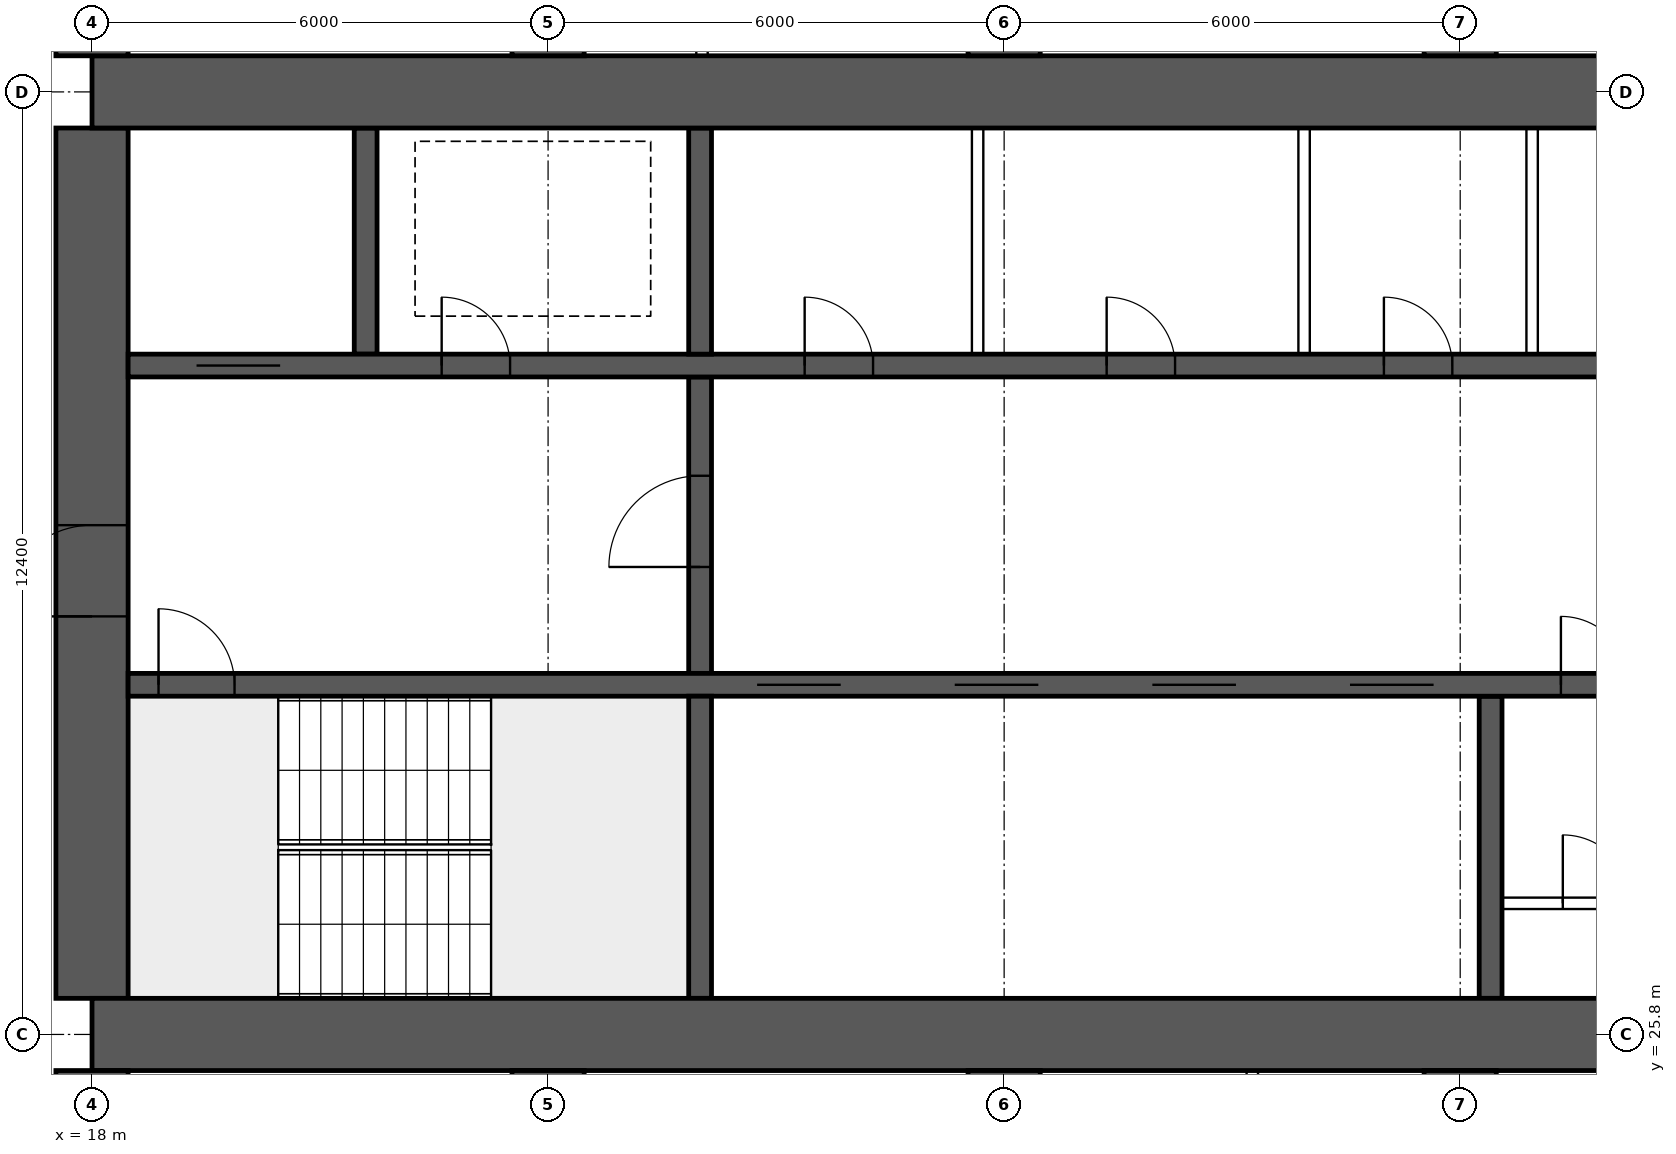
"""IFC4 building model, lengths in metres.
Left out: names, types, materials, properties, quantities, classifications, styles, units other than length and angle.
Written with IfcOpenShell. Run it as: python <this file> out.ifc"""

import sys

from ifc_helpers import new_model, si_unit, direction, frame, frame_2d, origin, place, context, subcontext, project, spatial, rectangle, extrude, element, fill, save


model = new_model("IFC4")
c1 = context("Model", 3, precision=1e-05, world=origin(), true_north=direction((0.0, 1.0)))
c2 = subcontext(c1, "Body", "Model", "MODEL_VIEW")
j1 = project(units=[si_unit("LENGTHUNIT", "METRE"), si_unit("PLANEANGLEUNIT", "RADIAN")], contexts=[c1])
p1 = place(None, origin())
s1 = spatial("IfcSite", under=j1, at=p1, CompositionType="ELEMENT")
p2 = place(p1, origin())
s2 = spatial("IfcBuilding", under=s1, at=p2, CompositionType="ELEMENT")
p3 = place(p2, frame((0.0, 0.0, 106.9)))
s3 = spatial("IfcBuildingStorey", under=s2, at=p3, CompositionType="ELEMENT", Elevation=106.9)
for number, where, z_axis, x_axis in (
    (1, (18.0, 25.8, 0.0), (0.0, 0.0, 1.0), (1.0, 0.0, 0.0)),
    (2, (18.0, 38.2, 0.0), (0.0, 0.0, 1.0), (1.0, 0.0, 0.0)),
):
    element("IfcWall", number, at=place(p3, frame(where, z_axis=z_axis, x_axis=x_axis)), inside=s3, PredefinedType="SHEAR", context=c2, shape_type="SweptSolid", body=[
        extrude(rectangle(XDim=48.0, YDim=0.95, at=frame_2d((24.0, 0.0))), origin(), (0.0, 0.0, 1.0), 3.75),
    ])
p4 = place(p3, frame((18.0, 26.275, 0.0), z_axis=(0.0, 0.0, 1.0), x_axis=(0.0, 1.0, 0.0)))
e3 = element("IfcWall", 3, at=p4, inside=s3, PredefinedType="SHEAR", context=c2, shape_type="SweptSolid", body=[
    extrude(rectangle(XDim=11.45, YDim=0.95, at=frame_2d((5.725, 0.0))), origin(), (0.0, 0.0, 1.0), 3.75),
])
p5 = place(p4, frame((5.025, 0.0, 0.0)))
e4 = element("IfcOpeningElement", 4, at=p5, cuts=e3, PredefinedType="OPENING", context=c2, shape_type="SweptSolid", body=[
    extrude(rectangle(XDim=1.2, YDim=2.1, at=frame_2d((0.6, 1.05))), frame((0.0, 0.485, 0.0), z_axis=(0.0, -1.0, 0.0), x_axis=(1.0, 0.0, 0.0)), (0.0, 0.0, 1.0), 0.97),
])
p6 = place(p3, frame((18.475, 30.4, 0.0), z_axis=(0.0, 0.0, 1.0), x_axis=(1.0, 0.0, 0.0)))
e5 = element("IfcWall", 5, at=p6, inside=s3, PredefinedType="SHEAR", context=c2, shape_type="SweptSolid", body=[
    extrude(rectangle(XDim=47.05, YDim=0.3, at=frame_2d((23.525, 0.0))), origin(), (0.0, 0.0, 1.0), 3.75),
])
p7 = place(p6, frame((0.4, 0.0, 0.0)))
e6 = element("IfcOpeningElement", 6, at=p7, cuts=e5, PredefinedType="OPENING", context=c2, shape_type="SweptSolid", body=[
    extrude(rectangle(XDim=1.0, YDim=2.1, at=frame_2d((0.5, 1.05))), frame((0.0, 0.16, 0.0), z_axis=(0.0, -1.0, 0.0), x_axis=(1.0, 0.0, 0.0)), (0.0, 0.0, 1.0), 0.32),
])
p8 = place(p6, frame((45.65, 0.0, 0.0)))
e7 = element("IfcOpeningElement", 7, at=p8, cuts=e5, PredefinedType="OPENING", context=c2, shape_type="SweptSolid", body=[
    extrude(rectangle(XDim=1.0, YDim=2.1, at=frame_2d((0.5, 1.05))), frame((0.0, 0.16, 0.0), z_axis=(0.0, -1.0, 0.0), x_axis=(1.0, 0.0, 0.0)), (0.0, 0.0, 1.0), 0.32),
])
p9 = place(p6, frame((8.275, 0.0, 0.0)))
e8 = element("IfcOpeningElement", 8, at=p9, cuts=e5, PredefinedType="OPENING", context=c2, shape_type="SweptSolid", body=[
    extrude(rectangle(XDim=1.1, YDim=2.1, at=frame_2d((0.55, 1.05))), frame((0.0, 0.16, 0.0), z_axis=(0.0, -1.0, 0.0), x_axis=(1.0, 0.0, 0.0)), (0.0, 0.0, 1.0), 0.32),
])
p10 = place(p6, frame((10.875, 0.0, 0.0)))
e9 = element("IfcOpeningElement", 9, at=p10, cuts=e5, PredefinedType="OPENING", context=c2, shape_type="SweptSolid", body=[
    extrude(rectangle(XDim=1.1, YDim=2.1, at=frame_2d((0.55, 1.05))), frame((0.0, 0.16, 0.0), z_axis=(0.0, -1.0, 0.0), x_axis=(1.0, 0.0, 0.0)), (0.0, 0.0, 1.0), 0.32),
])
p11 = place(p6, frame((13.475, 0.0, 0.0)))
e10 = element("IfcOpeningElement", 10, at=p11, cuts=e5, PredefinedType="OPENING", context=c2, shape_type="SweptSolid", body=[
    extrude(rectangle(XDim=1.1, YDim=2.1, at=frame_2d((0.55, 1.05))), frame((0.0, 0.16, 0.0), z_axis=(0.0, -1.0, 0.0), x_axis=(1.0, 0.0, 0.0)), (0.0, 0.0, 1.0), 0.32),
])
p12 = place(p6, frame((16.075, 0.0, 0.0)))
e11 = element("IfcOpeningElement", 11, at=p12, cuts=e5, PredefinedType="OPENING", context=c2, shape_type="SweptSolid", body=[
    extrude(rectangle(XDim=1.1, YDim=2.1, at=frame_2d((0.55, 1.05))), frame((0.0, 0.16, 0.0), z_axis=(0.0, -1.0, 0.0), x_axis=(1.0, 0.0, 0.0)), (0.0, 0.0, 1.0), 0.32),
])
p13 = place(p6, frame((18.85, 0.0, 0.0)))
e12 = element("IfcOpeningElement", 12, at=p13, cuts=e5, PredefinedType="OPENING", context=c2, shape_type="SweptSolid", body=[
    extrude(rectangle(XDim=0.9, YDim=2.1, at=frame_2d((0.45, 1.05))), frame((0.0, 0.16, 0.0), z_axis=(0.0, -1.0, 0.0), x_axis=(1.0, 0.0, 0.0)), (0.0, 0.0, 1.0), 0.32),
])
p14 = place(p6, frame((30.142, 0.0, 0.0)))
e13 = element("IfcOpeningElement", 13, at=p14, cuts=e5, PredefinedType="OPENING", context=c2, shape_type="SweptSolid", body=[
    extrude(rectangle(XDim=1.1, YDim=2.1, at=frame_2d((0.55, 1.05))), frame((0.0, 0.16, 0.0), z_axis=(0.0, -1.0, 0.0), x_axis=(1.0, 0.0, 0.0)), (0.0, 0.0, 1.0), 0.32),
])
p15 = place(p6, frame((33.675, 0.0, 0.0)))
e14 = element("IfcOpeningElement", 14, at=p15, cuts=e5, PredefinedType="OPENING", context=c2, shape_type="SweptSolid", body=[
    extrude(rectangle(XDim=1.1, YDim=2.1, at=frame_2d((0.55, 1.05))), frame((0.0, 0.16, 0.0), z_axis=(0.0, -1.0, 0.0), x_axis=(1.0, 0.0, 0.0)), (0.0, 0.0, 1.0), 0.32),
])
p16 = place(p6, frame((37.208, 0.0, 0.0)))
e15 = element("IfcOpeningElement", 15, at=p16, cuts=e5, PredefinedType="OPENING", context=c2, shape_type="SweptSolid", body=[
    extrude(rectangle(XDim=1.1, YDim=2.1, at=frame_2d((0.55, 1.05))), frame((0.0, 0.16, 0.0), z_axis=(0.0, -1.0, 0.0), x_axis=(1.0, 0.0, 0.0)), (0.0, 0.0, 1.0), 0.32),
])
p17 = place(p3, frame((18.475, 34.6, 0.0), z_axis=(0.0, 0.0, 1.0), x_axis=(1.0, 0.0, 0.0)))
e16 = element("IfcWall", 16, at=p17, inside=s3, PredefinedType="SHEAR", context=c2, shape_type="SweptSolid", body=[
    extrude(rectangle(XDim=47.05, YDim=0.3, at=frame_2d((23.525, 0.0))), origin(), (0.0, 0.0, 1.0), 3.75),
])
p18 = place(p17, frame((0.9, 0.0, 0.0)))
e17 = element("IfcOpeningElement", 17, at=p18, cuts=e16, PredefinedType="OPENING", context=c2, shape_type="SweptSolid", body=[
    extrude(rectangle(XDim=1.1, YDim=2.1, at=frame_2d((0.55, 1.05))), frame((0.0, 0.16, 0.0), z_axis=(0.0, -1.0, 0.0), x_axis=(1.0, 0.0, 0.0)), (0.0, 0.0, 1.0), 0.32),
])
p19 = place(p17, frame((45.05, 0.0, 0.0)))
e18 = element("IfcOpeningElement", 18, at=p19, cuts=e16, PredefinedType="OPENING", context=c2, shape_type="SweptSolid", body=[
    extrude(rectangle(XDim=1.1, YDim=2.1, at=frame_2d((0.55, 1.05))), frame((0.0, 0.16, 0.0), z_axis=(0.0, -1.0, 0.0), x_axis=(1.0, 0.0, 0.0)), (0.0, 0.0, 1.0), 0.32),
])
p20 = place(p17, frame((4.125, 0.0, 0.0)))
e19 = element("IfcOpeningElement", 19, at=p20, cuts=e16, PredefinedType="OPENING", context=c2, shape_type="SweptSolid", body=[
    extrude(rectangle(XDim=0.9, YDim=2.1, at=frame_2d((0.45, 1.05))), frame((0.0, 0.16, 0.0), z_axis=(0.0, -1.0, 0.0), x_axis=(1.0, 0.0, 0.0)), (0.0, 0.0, 1.0), 0.32),
])
p21 = place(p17, frame((42.025, 0.0, 0.0)))
e20 = element("IfcOpeningElement", 20, at=p21, cuts=e16, PredefinedType="OPENING", context=c2, shape_type="SweptSolid", body=[
    extrude(rectangle(XDim=0.9, YDim=2.1, at=frame_2d((0.45, 1.05))), frame((0.0, 0.16, 0.0), z_axis=(0.0, -1.0, 0.0), x_axis=(1.0, 0.0, 0.0)), (0.0, 0.0, 1.0), 0.32),
])
p22 = place(p17, frame((8.9, 0.0, 0.0)))
e21 = element("IfcOpeningElement", 21, at=p22, cuts=e16, PredefinedType="OPENING", context=c2, shape_type="SweptSolid", body=[
    extrude(rectangle(XDim=0.9, YDim=2.1, at=frame_2d((0.45, 1.05))), frame((0.0, 0.16, 0.0), z_axis=(0.0, -1.0, 0.0), x_axis=(1.0, 0.0, 0.0)), (0.0, 0.0, 1.0), 0.32),
])
p23 = place(p17, frame((12.874, 0.0, 0.0)))
e22 = element("IfcOpeningElement", 22, at=p23, cuts=e16, PredefinedType="OPENING", context=c2, shape_type="SweptSolid", body=[
    extrude(rectangle(XDim=0.9, YDim=2.1, at=frame_2d((0.45, 1.05))), frame((0.0, 0.16, 0.0), z_axis=(0.0, -1.0, 0.0), x_axis=(1.0, 0.0, 0.0)), (0.0, 0.0, 1.0), 0.32),
])
p24 = place(p17, frame((16.521, 0.0, 0.0)))
e23 = element("IfcOpeningElement", 23, at=p24, cuts=e16, PredefinedType="OPENING", context=c2, shape_type="SweptSolid", body=[
    extrude(rectangle(XDim=0.9, YDim=2.1, at=frame_2d((0.45, 1.05))), frame((0.0, 0.16, 0.0), z_axis=(0.0, -1.0, 0.0), x_axis=(1.0, 0.0, 0.0)), (0.0, 0.0, 1.0), 0.32),
])
p25 = place(p17, frame((20.28, 0.0, 0.0)))
e24 = element("IfcOpeningElement", 24, at=p25, cuts=e16, PredefinedType="OPENING", context=c2, shape_type="SweptSolid", body=[
    extrude(rectangle(XDim=0.9, YDim=2.1, at=frame_2d((0.45, 1.05))), frame((0.0, 0.16, 0.0), z_axis=(0.0, -1.0, 0.0), x_axis=(1.0, 0.0, 0.0)), (0.0, 0.0, 1.0), 0.32),
])
p26 = place(p17, frame((24.686, 0.0, 0.0)))
e25 = element("IfcOpeningElement", 25, at=p26, cuts=e16, PredefinedType="OPENING", context=c2, shape_type="SweptSolid", body=[
    extrude(rectangle(XDim=0.9, YDim=2.1, at=frame_2d((0.45, 1.05))), frame((0.0, 0.16, 0.0), z_axis=(0.0, -1.0, 0.0), x_axis=(1.0, 0.0, 0.0)), (0.0, 0.0, 1.0), 0.32),
])
p27 = place(p17, frame((27.483, 0.0, 0.0)))
e26 = element("IfcOpeningElement", 26, at=p27, cuts=e16, PredefinedType="OPENING", context=c2, shape_type="SweptSolid", body=[
    extrude(rectangle(XDim=0.9, YDim=2.1, at=frame_2d((0.45, 1.05))), frame((0.0, 0.16, 0.0), z_axis=(0.0, -1.0, 0.0), x_axis=(1.0, 0.0, 0.0)), (0.0, 0.0, 1.0), 0.32),
])
p28 = place(p17, frame((29.856, 0.0, 0.0)))
e27 = element("IfcOpeningElement", 27, at=p28, cuts=e16, PredefinedType="OPENING", context=c2, shape_type="SweptSolid", body=[
    extrude(rectangle(XDim=0.9, YDim=2.1, at=frame_2d((0.45, 1.05))), frame((0.0, 0.16, 0.0), z_axis=(0.0, -1.0, 0.0), x_axis=(1.0, 0.0, 0.0)), (0.0, 0.0, 1.0), 0.32),
])
p29 = place(p17, frame((35.326, 0.0, 0.0)))
e28 = element("IfcOpeningElement", 28, at=p29, cuts=e16, PredefinedType="OPENING", context=c2, shape_type="SweptSolid", body=[
    extrude(rectangle(XDim=0.9, YDim=2.1, at=frame_2d((0.45, 1.05))), frame((0.0, 0.16, 0.0), z_axis=(0.0, -1.0, 0.0), x_axis=(1.0, 0.0, 0.0)), (0.0, 0.0, 1.0), 0.32),
])
p30 = place(p3, frame((26.0, 26.275, 0.0), z_axis=(0.0, 0.0, 1.0), x_axis=(0.0, 1.0, 0.0)))
e29 = element("IfcWall", 29, at=p30, inside=s3, PredefinedType="SHEAR", context=c2, shape_type="SweptSolid", body=[
    extrude(rectangle(XDim=3.975, YDim=0.3, at=frame_2d((1.988, 0.0))), origin(), (0.0, 0.0, 1.0), 3.75),
])
p31 = place(p3, frame((26.0, 30.55, 0.0), z_axis=(0.0, 0.0, 1.0), x_axis=(0.0, 1.0, 0.0)))
e30 = element("IfcWall", 30, at=p31, inside=s3, PredefinedType="SHEAR", context=c2, shape_type="SweptSolid", body=[
    extrude(rectangle(XDim=3.9, YDim=0.3, at=frame_2d((1.95, 0.0))), origin(), (0.0, 0.0, 1.0), 3.75),
])
p32 = place(p31, frame((1.4, 0.0, 0.0)))
e31 = element("IfcOpeningElement", 31, at=p32, cuts=e30, PredefinedType="OPENING", context=c2, shape_type="SweptSolid", body=[
    extrude(rectangle(XDim=1.2, YDim=2.1, at=frame_2d((0.6, 1.05))), frame((0.0, 0.16, 0.0), z_axis=(0.0, -1.0, 0.0), x_axis=(1.0, 0.0, 0.0)), (0.0, 0.0, 1.0), 0.32),
])
for number, where, z_axis, x_axis in (
    (32, (21.6, 34.75, 0.0), (0.0, 0.0, 1.0), (0.0, 1.0, 0.0)),
    (33, (26.0, 34.75, 0.0), (0.0, 0.0, 1.0), (0.0, 1.0, 0.0)),
):
    element("IfcWall", number, at=place(p3, frame(where, z_axis=z_axis, x_axis=x_axis)), inside=s3, PredefinedType="SHEAR", context=c2, shape_type="SweptSolid", body=[
        extrude(rectangle(XDim=2.975, YDim=0.3, at=frame_2d((1.488, 0.0))), origin(), (0.0, 0.0, 1.0), 3.75),
    ])
p33 = place(p3, frame((36.4, 26.275, 0.0), z_axis=(0.0, 0.0, 1.0), x_axis=(0.0, 1.0, 0.0)))
e34 = element("IfcWall", 34, at=p33, inside=s3, PredefinedType="SHEAR", context=c2, shape_type="SweptSolid", body=[
    extrude(rectangle(XDim=3.975, YDim=0.3, at=frame_2d((1.988, 0.0))), origin(), (0.0, 0.0, 1.0), 3.75),
])
for number, where, z_axis, x_axis in (
    (35, (18.0, 16.0, 0.0), (0.0, 0.0, 1.0), (0.0, 1.0, 0.0)),
    (36, (18.0, 38.675, 0.0), (0.0, 0.0, 1.0), (0.0, 1.0, 0.0)),
    (37, (24.0, 16.0, 0.0), (0.0, 0.0, 1.0), (0.0, 1.0, 0.0)),
    (38, (24.0, 38.675, 0.0), (0.0, 0.0, 1.0), (0.0, 1.0, 0.0)),
    (39, (30.0, 16.0, 0.0), (0.0, 0.0, 1.0), (0.0, 1.0, 0.0)),
    (40, (30.0, 38.675, 0.0), (0.0, 0.0, 1.0), (0.0, 1.0, 0.0)),
    (41, (36.0, 16.0, 0.0), (0.0, 0.0, 1.0), (0.0, 1.0, 0.0)),
    (42, (36.0, 38.675, 0.0), (0.0, 0.0, 1.0), (0.0, 1.0, 0.0)),
):
    element("IfcWall", number, at=place(p3, frame(where, z_axis=z_axis, x_axis=x_axis)), inside=s3, PredefinedType="SHEAR", context=c2, shape_type="SweptSolid", body=[
        extrude(rectangle(XDim=9.325, YDim=0.95, at=frame_2d((4.663, 0.0))), origin(), (0.0, 0.0, 1.0), 3.75),
    ])
for number, where, z_axis, x_axis in (
    (43, (29.651, 34.75, 0.0), (0.0, 0.0, 1.0), (0.0, 1.0, 0.0)),
    (44, (33.946, 34.75, 0.0), (0.0, 0.0, 1.0), (0.0, 1.0, 0.0)),
    (45, (36.946, 34.75, 0.0), (0.0, 0.0, 1.0), (0.0, 1.0, 0.0)),
):
    element("IfcWall", number, at=place(p3, frame(where, z_axis=z_axis, x_axis=x_axis)), inside=s3, PredefinedType="SOLIDWALL", context=c2, shape_type="SweptSolid", body=[
        extrude(rectangle(XDim=2.975, YDim=0.15, at=frame_2d((1.488, 0.0))), origin(), (0.0, 0.0, 1.0), 3.5),
    ])
p34 = place(p3, frame((36.55, 27.525, 0.0), z_axis=(0.0, 0.0, 1.0), x_axis=(1.0, 0.0, 0.0)))
e46 = element("IfcWall", 46, at=p34, inside=s3, PredefinedType="SOLIDWALL", context=c2, shape_type="SweptSolid", body=[
    extrude(rectangle(XDim=2.5, YDim=0.15, at=frame_2d((1.25, 0.0))), origin(), (0.0, 0.0, 1.0), 3.5),
])
p35 = place(p34, frame((0.8, 0.0, 0.0)))
e47 = element("IfcOpeningElement", 47, at=p35, cuts=e46, PredefinedType="OPENING", context=c2, shape_type="SweptSolid", body=[
    extrude(rectangle(XDim=0.9, YDim=2.1, at=frame_2d((0.45, 1.05))), frame((0.0, 0.085, 0.0), z_axis=(0.0, -1.0, 0.0), x_axis=(1.0, 0.0, 0.0)), (0.0, 0.0, 1.0), 0.17),
])
for number, where, z_axis, x_axis in (
    (48, (33.265, 16.1, 0.0), (0.0, 0.0, 1.0), (0.0, 1.0, 0.0)),
    (49, (26.025, 38.675, 0.0), (0.0, 0.0, 1.0), (0.0, 1.0, 0.0)),
):
    element("IfcWall", number, at=place(p3, frame(where, z_axis=z_axis, x_axis=x_axis)), inside=s3, PredefinedType="PARTITIONING", context=c2, shape_type="SweptSolid", body=[
        extrude(rectangle(XDim=9.225, YDim=0.15, at=frame_2d((4.612, 0.0))), origin(), (0.0, 0.0, 1.0), 3.5),
    ])
p36 = place(p5, origin())
e50 = element("IfcDoor", 50, at=p36, inside=s3, OperationType="SINGLE_SWING_LEFT", PredefinedType="DOOR", context=c2, shape_type="SweptSolid", body=[
    extrude(rectangle(XDim=1.2, YDim=2.1, at=frame_2d((0.6, 1.05))), frame((0.0, 0.025, 0.0), z_axis=(0.0, -1.0, 0.0), x_axis=(1.0, 0.0, 0.0)), (0.0, 0.0, 1.0), 0.05),
])
fill(e4, e50)
p37 = place(p7, origin())
e51 = element("IfcDoor", 51, at=p37, inside=s3, OperationType="SINGLE_SWING_LEFT", PredefinedType="DOOR", context=c2, shape_type="SweptSolid", body=[
    extrude(rectangle(XDim=1.0, YDim=2.1, at=frame_2d((0.5, 1.05))), frame((0.0, 0.025, 0.0), z_axis=(0.0, -1.0, 0.0), x_axis=(1.0, 0.0, 0.0)), (0.0, 0.0, 1.0), 0.05),
])
fill(e6, e51)
p38 = place(p18, origin())
e52 = element("IfcDoor", 52, at=p38, inside=s3, OperationType="DOUBLE_DOOR_SLIDING", PredefinedType="DOOR", context=c2, shape_type="SweptSolid", body=[
    extrude(rectangle(XDim=1.1, YDim=2.1, at=frame_2d((0.55, 1.05))), frame((0.0, 0.025, 0.0), z_axis=(0.0, -1.0, 0.0), x_axis=(1.0, 0.0, 0.0)), (0.0, 0.0, 1.0), 0.05),
])
fill(e17, e52)
p39 = place(p20, origin())
e53 = element("IfcDoor", 53, at=p39, inside=s3, OperationType="SINGLE_SWING_LEFT", PredefinedType="DOOR", context=c2, shape_type="SweptSolid", body=[
    extrude(rectangle(XDim=0.9, YDim=2.1, at=frame_2d((0.45, 1.05))), frame((0.0, 0.025, 0.0), z_axis=(0.0, -1.0, 0.0), x_axis=(1.0, 0.0, 0.0)), (0.0, 0.0, 1.0), 0.05),
])
fill(e19, e53)
p40 = place(p32, origin())
e54 = element("IfcDoor", 54, at=p40, inside=s3, OperationType="SINGLE_SWING_LEFT", PredefinedType="DOOR", context=c2, shape_type="SweptSolid", body=[
    extrude(rectangle(XDim=1.2, YDim=2.1, at=frame_2d((0.6, 1.05))), frame((0.0, 0.025, 0.0), z_axis=(0.0, -1.0, 0.0), x_axis=(1.0, 0.0, 0.0)), (0.0, 0.0, 1.0), 0.05),
])
fill(e31, e54)
p41 = place(p22, origin())
e55 = element("IfcDoor", 55, at=p41, inside=s3, OperationType="SINGLE_SWING_LEFT", PredefinedType="DOOR", context=c2, shape_type="SweptSolid", body=[
    extrude(rectangle(XDim=0.9, YDim=2.1, at=frame_2d((0.45, 1.05))), frame((0.0, 0.025, 0.0), z_axis=(0.0, -1.0, 0.0), x_axis=(1.0, 0.0, 0.0)), (0.0, 0.0, 1.0), 0.05),
])
fill(e21, e55)
p42 = place(p23, origin())
e56 = element("IfcDoor", 56, at=p42, inside=s3, OperationType="SINGLE_SWING_LEFT", PredefinedType="DOOR", context=c2, shape_type="SweptSolid", body=[
    extrude(rectangle(XDim=0.9, YDim=2.1, at=frame_2d((0.45, 1.05))), frame((0.0, 0.025, 0.0), z_axis=(0.0, -1.0, 0.0), x_axis=(1.0, 0.0, 0.0)), (0.0, 0.0, 1.0), 0.05),
])
fill(e22, e56)
p43 = place(p24, origin())
e57 = element("IfcDoor", 57, at=p43, inside=s3, OperationType="SINGLE_SWING_LEFT", PredefinedType="DOOR", context=c2, shape_type="SweptSolid", body=[
    extrude(rectangle(XDim=0.9, YDim=2.1, at=frame_2d((0.45, 1.05))), frame((0.0, 0.025, 0.0), z_axis=(0.0, -1.0, 0.0), x_axis=(1.0, 0.0, 0.0)), (0.0, 0.0, 1.0), 0.05),
])
fill(e23, e57)
p44 = place(p9, origin())
e58 = element("IfcDoor", 58, at=p44, inside=s3, OperationType="DOUBLE_DOOR_SLIDING", PredefinedType="DOOR", context=c2, shape_type="SweptSolid", body=[
    extrude(rectangle(XDim=1.1, YDim=2.1, at=frame_2d((0.55, 1.05))), frame((0.0, 0.025, 0.0), z_axis=(0.0, -1.0, 0.0), x_axis=(1.0, 0.0, 0.0)), (0.0, 0.0, 1.0), 0.05),
])
fill(e8, e58)
p45 = place(p10, origin())
e59 = element("IfcDoor", 59, at=p45, inside=s3, OperationType="DOUBLE_DOOR_SLIDING", PredefinedType="DOOR", context=c2, shape_type="SweptSolid", body=[
    extrude(rectangle(XDim=1.1, YDim=2.1, at=frame_2d((0.55, 1.05))), frame((0.0, 0.025, 0.0), z_axis=(0.0, -1.0, 0.0), x_axis=(1.0, 0.0, 0.0)), (0.0, 0.0, 1.0), 0.05),
])
fill(e9, e59)
p46 = place(p11, origin())
e60 = element("IfcDoor", 60, at=p46, inside=s3, OperationType="DOUBLE_DOOR_SLIDING", PredefinedType="DOOR", context=c2, shape_type="SweptSolid", body=[
    extrude(rectangle(XDim=1.1, YDim=2.1, at=frame_2d((0.55, 1.05))), frame((0.0, 0.025, 0.0), z_axis=(0.0, -1.0, 0.0), x_axis=(1.0, 0.0, 0.0)), (0.0, 0.0, 1.0), 0.05),
])
fill(e10, e60)
p47 = place(p12, origin())
e61 = element("IfcDoor", 61, at=p47, inside=s3, OperationType="DOUBLE_DOOR_SLIDING", PredefinedType="DOOR", context=c2, shape_type="SweptSolid", body=[
    extrude(rectangle(XDim=1.1, YDim=2.1, at=frame_2d((0.55, 1.05))), frame((0.0, 0.025, 0.0), z_axis=(0.0, -1.0, 0.0), x_axis=(1.0, 0.0, 0.0)), (0.0, 0.0, 1.0), 0.05),
])
fill(e11, e61)
p48 = place(p35, origin())
e62 = element("IfcDoor", 62, at=p48, inside=s3, OperationType="SINGLE_SWING_LEFT", PredefinedType="DOOR", context=c2, shape_type="SweptSolid", body=[
    extrude(rectangle(XDim=0.9, YDim=2.1, at=frame_2d((0.45, 1.05))), frame((0.0, 0.025, 0.0), z_axis=(0.0, -1.0, 0.0), x_axis=(1.0, 0.0, 0.0)), (0.0, 0.0, 1.0), 0.05),
])
fill(e47, e62)
p49 = place(p13, origin())
e63 = element("IfcDoor", 63, at=p49, inside=s3, OperationType="SINGLE_SWING_LEFT", PredefinedType="DOOR", context=c2, shape_type="SweptSolid", body=[
    extrude(rectangle(XDim=0.9, YDim=2.1, at=frame_2d((0.45, 1.05))), frame((0.0, 0.025, 0.0), z_axis=(0.0, -1.0, 0.0), x_axis=(1.0, 0.0, 0.0)), (0.0, 0.0, 1.0), 0.05),
])
fill(e12, e63)
save(model, sys.argv[1])
